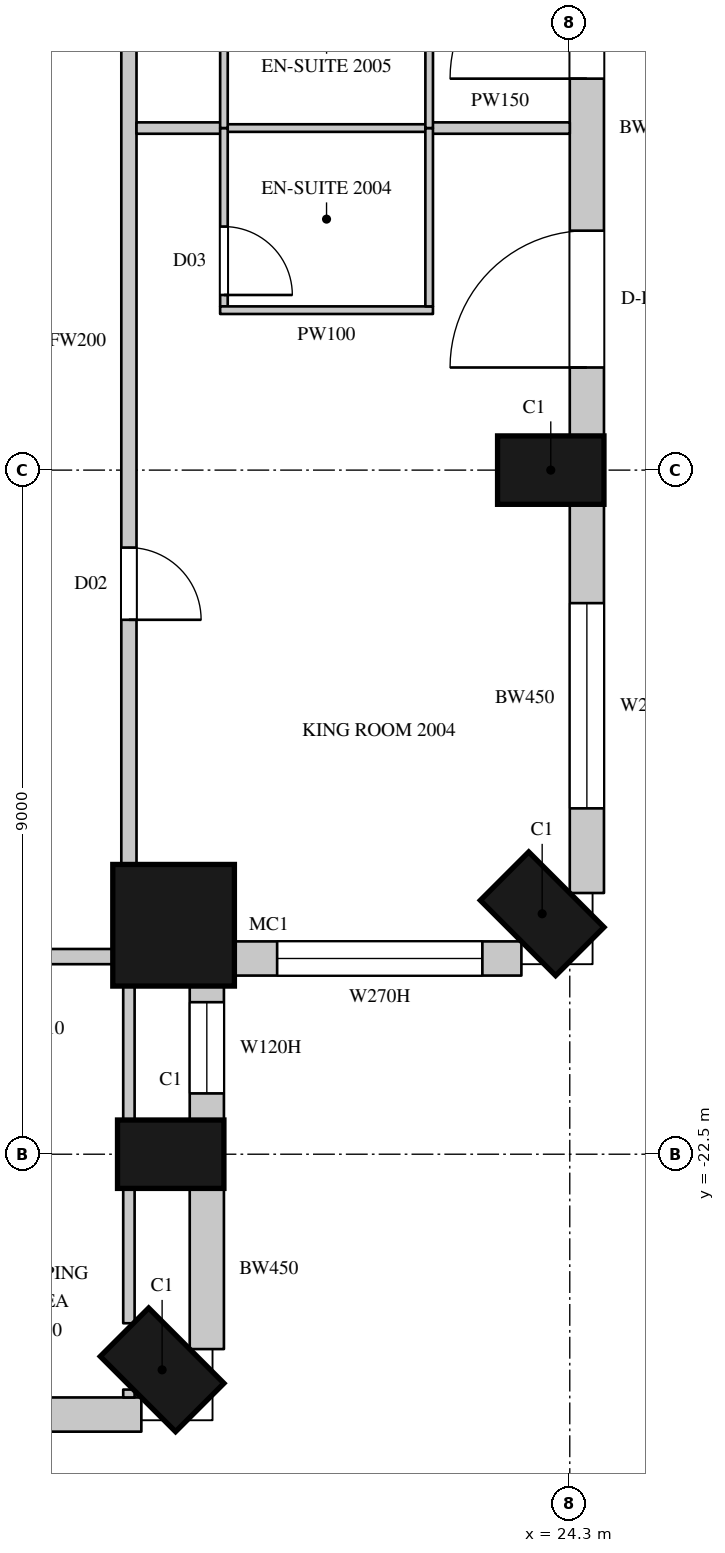
"""IFC4 building model, lengths in metres.
Left out: names, types, materials, properties, quantities, classifications, styles, units other than length and angle.
Written with IfcOpenShell. Run it as: python <this file> out.ifc"""

import sys

from ifc_helpers import new_model, si_unit, direction, frame, frame_2d, origin, origin_2d, place, context, subcontext, project, spatial, rectangle, circle, extrude, element, fill, save


model = new_model("IFC4")
c1 = context("Model", 3, precision=1e-05, world=origin(), true_north=direction((0.0, 1.0)))
c2 = subcontext(c1, "Body", "Model", "MODEL_VIEW")
j1 = project(units=[si_unit("LENGTHUNIT", "METRE"), si_unit("PLANEANGLEUNIT", "RADIAN")], contexts=[c1])
p1 = place(None, origin())
s1 = spatial("IfcSite", under=j1, at=p1, CompositionType="ELEMENT")
p2 = place(p1, origin())
s2 = spatial("IfcBuilding", under=s1, at=p2, CompositionType="ELEMENT")
p3 = place(p2, frame((0.0, 0.0, 102.3)))
s3 = spatial("IfcBuildingStorey", under=s2, at=p3, CompositionType="ELEMENT", Elevation=102.3)
for number, where, z_axis, x_axis in (
    (1, (18.937, -25.337, 0.0), (0.0, 0.0, 1.0), (0.707, 0.707, 0.0)),
    (2, (19.05, -22.5, 0.0), (0.0, 0.0, 1.0), (0.0, 1.0, 0.0)),
):
    element("IfcColumn", number, at=place(p3, frame(where, z_axis=z_axis, x_axis=x_axis)), inside=s3, PredefinedType="COLUMN", context=c2, shape_type="SweptSolid", body=[
        extrude(rectangle(XDim=0.9, YDim=1.4, at=origin_2d()), origin(), (0.0, 0.0, 1.0), 3.6),
    ])
p4 = place(p3, frame((19.088, -19.488, 0.0), z_axis=(0.0, 0.0, 1.0), x_axis=(1.0, 0.0, 0.0)))
e3 = element("IfcColumn", 3, at=p4, inside=s3, PredefinedType="COLUMN", context=c2, shape_type="SweptSolid", body=[
    extrude(circle(Radius=0.8, at=origin_2d()), origin(), (0.0, 0.0, 1.0), 3.6),
])
for number, where, z_axis, x_axis in (
    (4, (23.937, -19.337, 0.0), (0.0, 0.0, 1.0), (0.707, 0.707, 0.0)),
    (5, (24.05, -13.5, 0.0), (0.0, 0.0, 1.0), (0.0, 1.0, 0.0)),
):
    element("IfcColumn", number, at=place(p3, frame(where, z_axis=z_axis, x_axis=x_axis)), inside=s3, PredefinedType="COLUMN", context=c2, shape_type="SweptSolid", body=[
        extrude(rectangle(XDim=0.9, YDim=1.4, at=origin_2d()), origin(), (0.0, 0.0, 1.0), 3.6),
    ])
p5 = place(p3, frame((15.75, -25.925, 0.0), z_axis=(0.0, 0.0, 1.0), x_axis=(1.0, 0.0, 0.0)))
e6 = element("IfcWall", 6, at=p5, inside=s3, PredefinedType="SOLIDWALL", context=c2, shape_type="SweptSolid", body=[
    extrude(rectangle(XDim=2.914, YDim=0.45, at=frame_2d((1.457, 0.0))), origin(), (0.0, 0.0, 1.0), 3.3),
])
p6 = place(p3, frame((19.525, -25.064, 0.0), z_axis=(0.0, 0.0, 1.0), x_axis=(0.0, 1.0, 0.0)))
e7 = element("IfcWall", 7, at=p6, inside=s3, PredefinedType="SOLIDWALL", context=c2, shape_type="SweptSolid", body=[
    extrude(rectangle(XDim=2.114, YDim=0.45, at=frame_2d((1.057, 0.0))), origin(), (0.0, 0.0, 1.0), 3.3),
])
p7 = place(p3, frame((19.525, -22.05, 0.0), z_axis=(0.0, 0.0, 1.0), x_axis=(0.0, 1.0, 0.0)))
e8 = element("IfcWall", 8, at=p7, inside=s3, PredefinedType="SOLIDWALL", context=c2, shape_type="SweptSolid", body=[
    extrude(rectangle(XDim=1.792, YDim=0.45, at=frame_2d((0.896, 0.0))), origin(), (0.0, 0.0, 1.0), 3.3),
])
p8 = place(p7, frame((0.35, 0.0, 1.05)))
e9 = element("IfcOpeningElement", 9, at=p8, cuts=e8, PredefinedType="OPENING", context=c2, shape_type="SweptSolid", body=[
    extrude(rectangle(XDim=1.2, YDim=2.0, at=frame_2d((0.6, 1.0))), frame((0.0, 0.235, 0.0), z_axis=(0.0, -1.0, 0.0), x_axis=(1.0, 0.0, 0.0)), (0.0, 0.0, 1.0), 0.47),
])
p9 = place(p3, frame((19.858, -19.925, 0.0), z_axis=(0.0, 0.0, 1.0), x_axis=(1.0, 0.0, 0.0)))
e10 = element("IfcWall", 10, at=p9, inside=s3, PredefinedType="SOLIDWALL", context=c2, shape_type="SweptSolid", body=[
    extrude(rectangle(XDim=3.805, YDim=0.45, at=frame_2d((1.903, 0.0))), origin(), (0.0, 0.0, 1.0), 3.3),
])
p10 = place(p9, frame((0.592, 0.0, 1.05)))
e11 = element("IfcOpeningElement", 11, at=p10, cuts=e10, PredefinedType="OPENING", context=c2, shape_type="SweptSolid", body=[
    extrude(rectangle(XDim=2.7, YDim=2.0, at=frame_2d((1.35, 1.0))), frame((0.0, 0.235, 0.0), z_axis=(0.0, -1.0, 0.0), x_axis=(1.0, 0.0, 0.0)), (0.0, 0.0, 1.0), 0.47),
])
p11 = place(p3, frame((24.525, -19.064, 0.0), z_axis=(0.0, 0.0, 1.0), x_axis=(0.0, 1.0, 0.0)))
e12 = element("IfcWall", 12, at=p11, inside=s3, PredefinedType="SOLIDWALL", context=c2, shape_type="SweptSolid", body=[
    extrude(rectangle(XDim=5.114, YDim=0.45, at=frame_2d((2.557, 0.0))), origin(), (0.0, 0.0, 1.0), 3.3),
])
p12 = place(p11, frame((1.114, 0.0, 1.05)))
e13 = element("IfcOpeningElement", 13, at=p12, cuts=e12, PredefinedType="OPENING", context=c2, shape_type="SweptSolid", body=[
    extrude(rectangle(XDim=2.7, YDim=2.0, at=frame_2d((1.35, 1.0))), frame((0.0, 0.235, 0.0), z_axis=(0.0, -1.0, 0.0), x_axis=(1.0, 0.0, 0.0)), (0.0, 0.0, 1.0), 0.47),
])
p13 = place(p3, frame((24.525, -13.05, 0.0), z_axis=(0.0, 0.0, 1.0), x_axis=(0.0, 1.0, 0.0)))
e14 = element("IfcWall", 14, at=p13, inside=s3, PredefinedType="SOLIDWALL", context=c2, shape_type="SweptSolid", body=[
    extrude(rectangle(XDim=8.1, YDim=0.45, at=frame_2d((4.05, 0.0))), origin(), (0.0, 0.0, 1.0), 3.3),
])
p14 = place(p13, frame((0.9, 0.0, 0.0)))
e15 = element("IfcOpeningElement", 15, at=p14, cuts=e14, PredefinedType="OPENING", context=c2, shape_type="SweptSolid", body=[
    extrude(rectangle(XDim=1.8, YDim=2.4, at=frame_2d((0.9, 1.2))), frame((0.0, 0.235, 0.0), z_axis=(0.0, -1.0, 0.0), x_axis=(1.0, 0.0, 0.0)), (0.0, 0.0, 1.0), 0.47),
])
p15 = place(p13, frame((4.7, 0.0, 0.0)))
e16 = element("IfcOpeningElement", 16, at=p15, cuts=e14, PredefinedType="OPENING", context=c2, shape_type="SweptSolid", body=[
    extrude(rectangle(XDim=1.8, YDim=2.4, at=frame_2d((0.9, 1.2))), frame((0.0, 0.235, 0.0), z_axis=(0.0, -1.0, 0.0), x_axis=(1.0, 0.0, 0.0)), (0.0, 0.0, 1.0), 0.47),
])
p16 = place(p13, frame((6.7, 0.0, 1.05)))
e17 = element("IfcOpeningElement", 17, at=p16, cuts=e14, PredefinedType="OPENING", context=c2, shape_type="SweptSolid", body=[
    extrude(rectangle(XDim=1.2, YDim=2.0, at=frame_2d((0.6, 1.0))), frame((0.0, 0.235, 0.0), z_axis=(0.0, -1.0, 0.0), x_axis=(1.0, 0.0, 0.0)), (0.0, 0.0, 1.0), 0.47),
])
p17 = place(p3, frame((-23.765, -19.9, 0.0), z_axis=(0.0, 0.0, 1.0), x_axis=(1.0, 0.0, 0.0)))
e18 = element("IfcWall", 18, at=p17, inside=s3, PredefinedType="PARTITIONING", context=c2, shape_type="SweptSolid", body=[
    extrude(rectangle(XDim=42.125, YDim=0.2, at=frame_2d((21.063, 0.0))), origin(), (0.0, 0.0, 1.0), 3.3),
])
p18 = place(p17, frame((6.2, 0.0, 0.0)))
e19 = element("IfcOpeningElement", 19, at=p18, cuts=e18, PredefinedType="OPENING", context=c2, shape_type="SweptSolid", body=[
    extrude(rectangle(XDim=0.95, YDim=2.2, at=frame_2d((0.475, 1.1))), frame((0.0, 0.11, 0.0), z_axis=(0.0, -1.0, 0.0), x_axis=(1.0, 0.0, 0.0)), (0.0, 0.0, 1.0), 0.22),
])
p19 = place(p17, frame((14.1, 0.0, 0.0)))
e20 = element("IfcOpeningElement", 20, at=p19, cuts=e18, PredefinedType="OPENING", context=c2, shape_type="SweptSolid", body=[
    extrude(rectangle(XDim=1.1, YDim=2.4, at=frame_2d((0.55, 1.2))), frame((0.0, 0.11, 0.0), z_axis=(0.0, -1.0, 0.0), x_axis=(1.0, 0.0, 0.0)), (0.0, 0.0, 1.0), 0.22),
])
p20 = place(p17, frame((24.2, 0.0, 0.0)))
e21 = element("IfcOpeningElement", 21, at=p20, cuts=e18, PredefinedType="OPENING", context=c2, shape_type="SweptSolid", body=[
    extrude(rectangle(XDim=0.95, YDim=2.2, at=frame_2d((0.475, 1.1))), frame((0.0, 0.11, 0.0), z_axis=(0.0, -1.0, 0.0), x_axis=(1.0, 0.0, 0.0)), (0.0, 0.0, 1.0), 0.22),
])
p21 = place(p17, frame((32.9, 0.0, 0.0)))
e22 = element("IfcOpeningElement", 22, at=p21, cuts=e18, PredefinedType="OPENING", context=c2, shape_type="SweptSolid", body=[
    extrude(rectangle(XDim=1.1, YDim=2.4, at=frame_2d((0.55, 1.2))), frame((0.0, 0.11, 0.0), z_axis=(0.0, -1.0, 0.0), x_axis=(1.0, 0.0, 0.0)), (0.0, 0.0, 1.0), 0.22),
])
p22 = place(p3, frame((18.5, -18.869, 0.0), z_axis=(0.0, 0.0, 1.0), x_axis=(0.0, 1.0, 0.0)))
e23 = element("IfcWall", 23, at=p22, inside=s3, PredefinedType="PARTITIONING", context=c2, shape_type="SweptSolid", body=[
    extrude(rectangle(XDim=14.119, YDim=0.2, at=frame_2d((7.06, 0.0))), origin(), (0.0, 0.0, 1.0), 3.3),
])
p23 = place(p22, frame((3.4, 0.0, 0.0)))
e24 = element("IfcOpeningElement", 24, at=p23, cuts=e23, PredefinedType="OPENING", context=c2, shape_type="SweptSolid", body=[
    extrude(rectangle(XDim=0.95, YDim=2.2, at=frame_2d((0.475, 1.1))), frame((0.0, 0.11, 0.0), z_axis=(0.0, -1.0, 0.0), x_axis=(1.0, 0.0, 0.0)), (0.0, 0.0, 1.0), 0.22),
])
p24 = place(p22, frame((12.8, 0.0, 0.0)))
e25 = element("IfcOpeningElement", 25, at=p24, cuts=e23, PredefinedType="OPENING", context=c2, shape_type="SweptSolid", body=[
    extrude(rectangle(XDim=0.95, YDim=2.2, at=frame_2d((0.475, 1.1))), frame((0.0, 0.11, 0.0), z_axis=(0.0, -1.0, 0.0), x_axis=(1.0, 0.0, 0.0)), (0.0, 0.0, 1.0), 0.22),
])
p25 = place(p3, frame((18.5, -25.7, 0.0), z_axis=(0.0, 0.0, 1.0), x_axis=(0.0, 1.0, 0.0)))
e26 = element("IfcWall", 26, at=p25, inside=s3, PredefinedType="PARTITIONING", context=c2, shape_type="SweptSolid", body=[
    extrude(rectangle(XDim=0.104, YDim=0.15, at=frame_2d((0.052, 0.0))), origin(), (0.0, 0.0, 1.0), 3.3),
])
p26 = place(p3, frame((18.5, -24.724, 0.0), z_axis=(0.0, 0.0, 1.0), x_axis=(0.0, 1.0, 0.0)))
e27 = element("IfcWall", 27, at=p26, inside=s3, PredefinedType="PARTITIONING", context=c2, shape_type="SweptSolid", body=[
    extrude(rectangle(XDim=1.774, YDim=0.15, at=frame_2d((0.887, 0.0))), origin(), (0.0, 0.0, 1.0), 3.3),
])
p27 = place(p3, frame((18.5, -22.05, 0.0), z_axis=(0.0, 0.0, 1.0), x_axis=(0.0, 1.0, 0.0)))
e28 = element("IfcWall", 28, at=p27, inside=s3, PredefinedType="PARTITIONING", context=c2, shape_type="SweptSolid", body=[
    extrude(rectangle(XDim=1.964, YDim=0.15, at=frame_2d((0.982, 0.0))), origin(), (0.0, 0.0, 1.0), 3.3),
])
p28 = place(p3, frame((18.6, -9.0, 0.0), z_axis=(0.0, 0.0, 1.0), x_axis=(1.0, 0.0, 0.0)))
e29 = element("IfcWall", 29, at=p28, inside=s3, PredefinedType="PARTITIONING", context=c2, shape_type="SweptSolid", body=[
    extrude(rectangle(XDim=1.13, YDim=0.15, at=frame_2d((0.565, 0.0))), origin(), (0.0, 0.0, 1.0), 2.65),
])
p29 = place(p3, frame((22.47, -9.0, 0.0), z_axis=(0.0, 0.0, 1.0), x_axis=(1.0, 0.0, 0.0)))
e30 = element("IfcWall", 30, at=p29, inside=s3, PredefinedType="PARTITIONING", context=c2, shape_type="SweptSolid", body=[
    extrude(rectangle(XDim=1.83, YDim=0.15, at=frame_2d((0.915, 0.0))), origin(), (0.0, 0.0, 1.0), 2.65),
])
p30 = place(p3, frame((19.73, -9.0, 0.0), z_axis=(0.0, 0.0, 1.0), x_axis=(1.0, 0.0, 0.0)))
e31 = element("IfcWall", 31, at=p30, inside=s3, PredefinedType="PARTITIONING", context=c2, shape_type="SweptSolid", body=[
    extrude(rectangle(XDim=2.74, YDim=0.1, at=frame_2d((1.37, 0.0))), origin(), (0.0, 0.0, 1.0), 2.65),
])
p31 = place(p3, frame((19.75, -11.346, 0.0), z_axis=(0.0, 0.0, 1.0), x_axis=(0.0, 1.0, 0.0)))
e32 = element("IfcWall", 32, at=p31, inside=s3, PredefinedType="PARTITIONING", context=c2, shape_type="SweptSolid", body=[
    extrude(rectangle(XDim=2.346, YDim=0.1, at=frame_2d((1.173, 0.0))), origin(), (0.0, 0.0, 1.0), 3.3),
])
p32 = place(p31, frame((0.15, 0.0, 0.0)))
e33 = element("IfcOpeningElement", 33, at=p32, cuts=e32, PredefinedType="OPENING", context=c2, shape_type="SweptSolid", body=[
    extrude(rectangle(XDim=0.9, YDim=2.2, at=frame_2d((0.45, 1.1))), frame((0.0, 0.06, 0.0), z_axis=(0.0, -1.0, 0.0), x_axis=(1.0, 0.0, 0.0)), (0.0, 0.0, 1.0), 0.12),
])
p33 = place(p3, frame((19.7, -11.396, 0.0), z_axis=(0.0, 0.0, 1.0), x_axis=(1.0, 0.0, 0.0)))
e34 = element("IfcWall", 34, at=p33, inside=s3, PredefinedType="PARTITIONING", context=c2, shape_type="SweptSolid", body=[
    extrude(rectangle(XDim=2.8, YDim=0.1, at=frame_2d((1.4, 0.0))), origin(), (0.0, 0.0, 1.0), 3.3),
])
p34 = place(p3, frame((19.75, -9.0, 0.0), z_axis=(0.0, 0.0, 1.0), x_axis=(0.000399241409, 0.999999920303, 0.0)))
e35 = element("IfcWall", 35, at=p34, inside=s3, PredefinedType="PARTITIONING", context=c2, shape_type="SweptSolid", body=[
    extrude(rectangle(XDim=2.446, YDim=0.1, at=frame_2d((1.223, 0.0))), origin(), (0.0, 0.0, 1.0), 3.3),
])
p35 = place(p34, frame((1.3, 0.0, 0.0)))
e36 = element("IfcOpeningElement", 36, at=p35, cuts=e35, PredefinedType="OPENING", context=c2, shape_type="SweptSolid", body=[
    extrude(rectangle(XDim=0.9, YDim=2.2, at=frame_2d((0.45, 1.1))), frame((0.0, 0.06, 0.0), z_axis=(0.0, -1.0, 0.0), x_axis=(1.0, 0.0, 0.0)), (0.0, 0.0, 1.0), 0.12),
])
p36 = place(p3, frame((22.45, -11.346, 0.0), z_axis=(0.0, 0.0, 1.0), x_axis=(0.0, 1.0, 0.0)))
e37 = element("IfcWall", 37, at=p36, inside=s3, PredefinedType="PARTITIONING", context=c2, shape_type="SweptSolid", body=[
    extrude(rectangle(XDim=2.346, YDim=0.1, at=frame_2d((1.173, 0.0))), origin(), (0.0, 0.0, 1.0), 3.3),
])
p37 = place(p3, frame((22.45, -9.0, 0.0), z_axis=(0.0, 0.0, 1.0), x_axis=(0.00041644973, 0.999999913285, 0.0)))
e38 = element("IfcWall", 38, at=p37, inside=s3, PredefinedType="PARTITIONING", context=c2, shape_type="SweptSolid", body=[
    extrude(rectangle(XDim=2.345, YDim=0.1, at=frame_2d((1.172, 0.0))), origin(), (0.0, 0.0, 1.0), 3.3),
])
p38 = place(p8, origin())
e39 = element("IfcWindow", 39, at=p38, inside=s3, PartitioningType="SINGLE_PANEL", PredefinedType="WINDOW", context=c2, shape_type="SweptSolid", body=[
    extrude(rectangle(XDim=1.2, YDim=2.0, at=frame_2d((0.6, 1.0))), frame((0.0, 0.135, 0.0), z_axis=(0.0, -1.0, 0.0), x_axis=(1.0, 0.0, 0.0)), (0.0, 0.0, 1.0), 0.06),
])
fill(e9, e39)
p39 = place(p10, origin())
e40 = element("IfcWindow", 40, at=p39, inside=s3, PartitioningType="SINGLE_PANEL", PredefinedType="WINDOW", context=c2, shape_type="SweptSolid", body=[
    extrude(rectangle(XDim=2.7, YDim=2.0, at=frame_2d((1.35, 1.0))), frame((0.0, 0.135, 0.0), z_axis=(0.0, -1.0, 0.0), x_axis=(1.0, 0.0, 0.0)), (0.0, 0.0, 1.0), 0.06),
])
fill(e11, e40)
p40 = place(p12, origin())
e41 = element("IfcWindow", 41, at=p40, inside=s3, PartitioningType="SINGLE_PANEL", PredefinedType="WINDOW", context=c2, shape_type="SweptSolid", body=[
    extrude(rectangle(XDim=2.7, YDim=2.0, at=frame_2d((1.35, 1.0))), frame((0.0, 0.135, 0.0), z_axis=(0.0, -1.0, 0.0), x_axis=(1.0, 0.0, 0.0)), (0.0, 0.0, 1.0), 0.06),
])
fill(e13, e41)
p41 = place(p14, origin())
e42 = element("IfcDoor", 42, at=p41, inside=s3, OperationType="SLIDING_TO_LEFT", PredefinedType="DOOR", context=c2, shape_type="SweptSolid", body=[
    extrude(rectangle(XDim=1.8, YDim=2.4, at=frame_2d((0.9, 1.2))), frame((0.0, 0.13, 0.0), z_axis=(0.0, -1.0, 0.0), x_axis=(1.0, 0.0, 0.0)), (0.0, 0.0, 1.0), 0.05),
])
fill(e15, e42)
p42 = place(p15, origin())
e43 = element("IfcDoor", 43, at=p42, inside=s3, OperationType="SLIDING_TO_LEFT", PredefinedType="DOOR", context=c2, shape_type="SweptSolid", body=[
    extrude(rectangle(XDim=1.8, YDim=2.4, at=frame_2d((0.9, 1.2))), frame((0.0, 0.13, 0.0), z_axis=(0.0, -1.0, 0.0), x_axis=(1.0, 0.0, 0.0)), (0.0, 0.0, 1.0), 0.05),
])
fill(e16, e43)
p43 = place(p23, origin())
e44 = element("IfcDoor", 44, at=p43, inside=s3, OperationType="SINGLE_SWING_RIGHT", PredefinedType="DOOR", context=c2, shape_type="SweptSolid", body=[
    extrude(rectangle(XDim=0.95, YDim=2.2, at=frame_2d((0.475, 1.1))), frame((0.0, 0.025, 0.0), z_axis=(0.0, -1.0, 0.0), x_axis=(1.0, 0.0, 0.0)), (0.0, 0.0, 1.0), 0.05),
])
fill(e24, e44)
p44 = place(p32, origin())
e45 = element("IfcDoor", 45, at=p44, inside=s3, OperationType="SINGLE_SWING_RIGHT", PredefinedType="DOOR", context=c2, shape_type="SweptSolid", body=[
    extrude(rectangle(XDim=0.9, YDim=2.2, at=frame_2d((0.45, 1.1))), frame((0.0, 0.025, 0.0), z_axis=(0.0, -1.0, 0.0), x_axis=(1.0, 0.0, 0.0)), (0.0, 0.0, 1.0), 0.05),
])
fill(e33, e45)
save(model, sys.argv[1])
